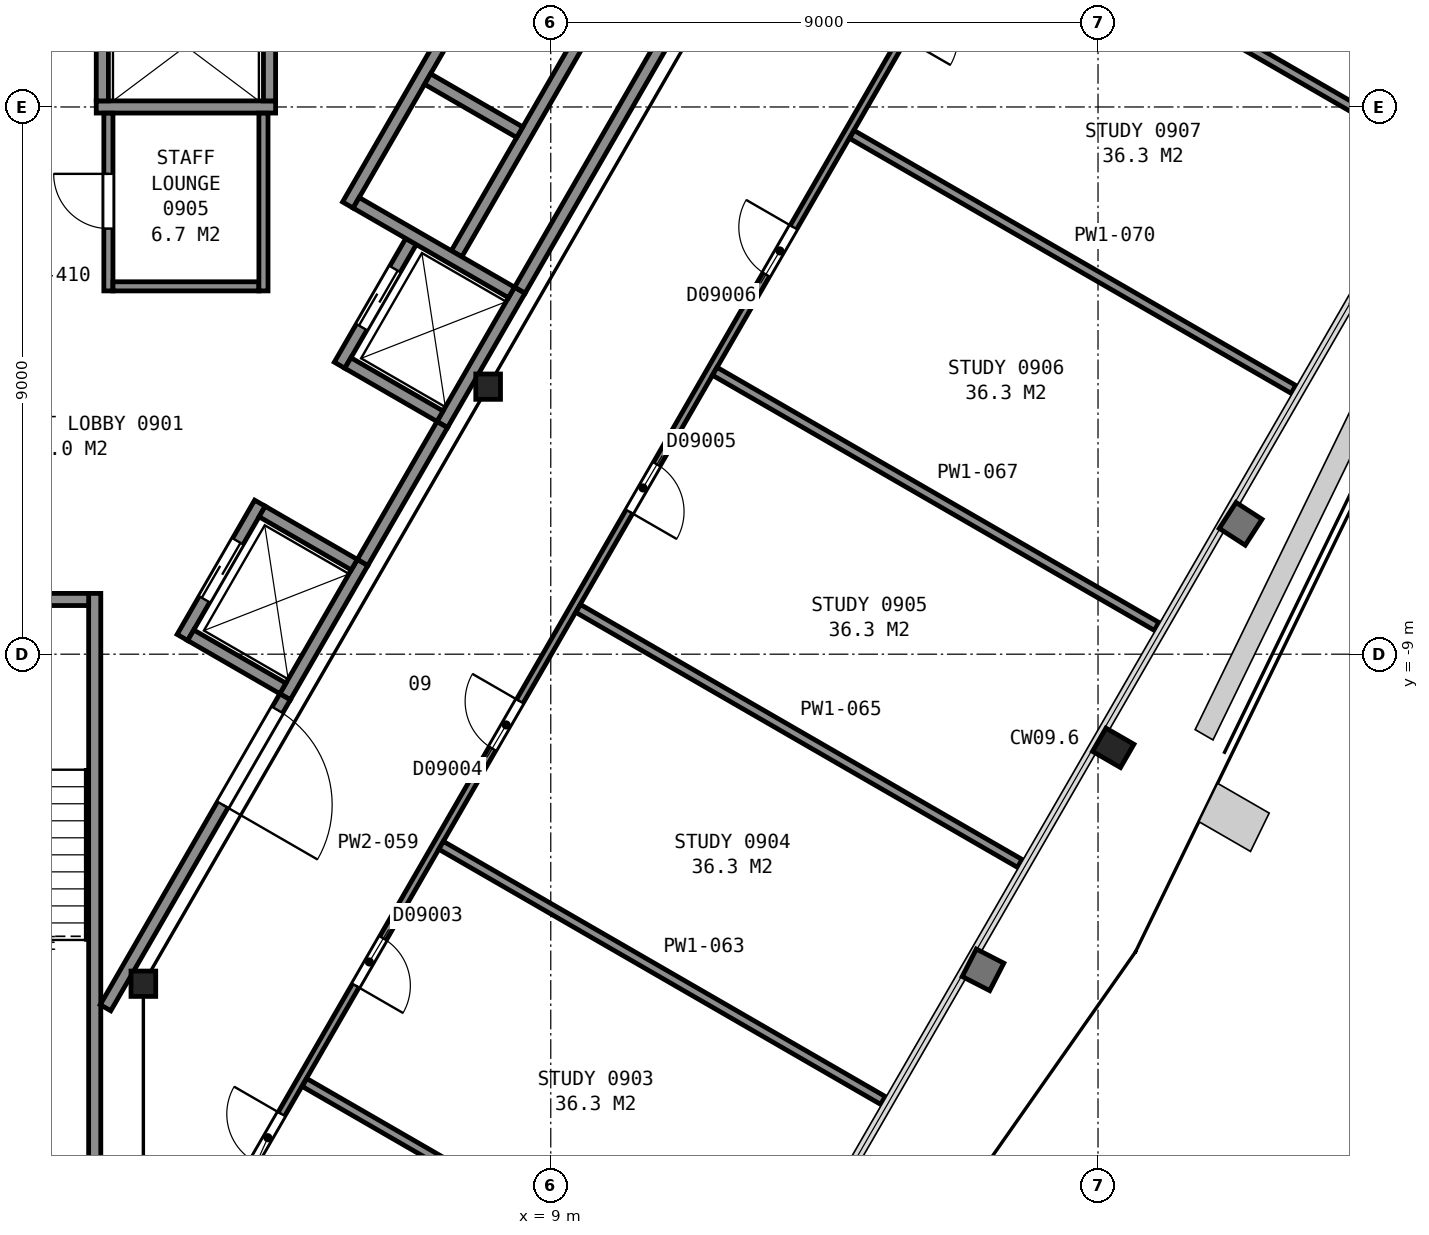
"""IFC4 building model, lengths in metres.
Left out: names, types, materials, properties, quantities, classifications, styles, units other than length and angle.
Written with IfcOpenShell. Run it as: python <this file> out.ifc"""

import sys

from ifc_helpers import new_model, si_unit, direction, frame, frame_2d, origin, origin_2d, place, context, subcontext, project, spatial, rectangle, i_section, extrude, element, fill, save


model = new_model("IFC4")
c1 = context("Model", 3, precision=1e-05, world=origin(), true_north=direction((0.0, 1.0)))
c2 = subcontext(c1, "Body", "Model", "MODEL_VIEW")
j1 = project(units=[si_unit("LENGTHUNIT", "METRE"), si_unit("PLANEANGLEUNIT", "RADIAN")], contexts=[c1])
p1 = place(None, origin())
s1 = spatial("IfcSite", under=j1, at=p1, CompositionType="ELEMENT")
p2 = place(p1, origin())
s2 = spatial("IfcBuilding", under=s1, at=p2, CompositionType="ELEMENT")
p3 = place(p2, frame((0.0, 0.0, 47.6)))
s3 = spatial("IfcBuildingStorey", under=s2, at=p3, CompositionType="ELEMENT", Elevation=47.6)
p4 = place(p3, frame((18.25, -10.54, 0.025), z_axis=(0.0, 0.0, 1.0), x_axis=(-0.5, -0.866025403784, 0.0)))
e1 = element("IfcColumn", 1, at=p4, inside=s3, PredefinedType="COLUMN", context=c2, shape_type="SweptSolid", body=[
    extrude(i_section(OverallWidth=0.442, OverallDepth=0.531, WebThickness=0.066, FlangeThickness=0.106, FilletRadius=0.015, at=origin_2d()), origin(), (0.0, 0.0, 1.0), 3.575),
])
for number, where, z_axis, x_axis in (
    (2, (2.3, -14.42, 0.0), (0.0, 0.0, 1.0), (1.0, 0.0, 0.0)),
    (3, (7.97, -4.6, 0.0), (0.0, 0.0, 1.0), (1.0, 0.0, 0.0)),
):
    element("IfcColumn", number, at=place(p3, frame(where, z_axis=z_axis, x_axis=x_axis)), inside=s3, PredefinedType="COLUMN", context=c2, shape_type="SweptSolid", body=[
        extrude(i_section(OverallWidth=0.406, OverallDepth=0.417, WebThickness=0.03, FlangeThickness=0.048, FilletRadius=0.015, at=origin_2d()), origin(), (0.0, 0.0, 1.0), 3.6),
    ])
p5 = place(p3, frame((1.5, -8.0, 0.0), z_axis=(0.0, 0.0, 1.0), x_axis=(0.0, -1.0, 0.0)))
e4 = element("IfcWall", 4, at=p5, inside=s3, PredefinedType="PARTITIONING", context=c2, shape_type="SweptSolid", body=[
    extrude(rectangle(XDim=12.0, YDim=0.2, at=frame_2d((6.0, 0.0))), origin(), (0.0, 0.0, 1.0), 3.35),
])
p6 = place(p3, frame((-1.4, -8.1, 0.0), z_axis=(0.0, 0.0, 1.0), x_axis=(1.0, 0.0, 0.0)))
e5 = element("IfcWall", 5, at=p6, inside=s3, PredefinedType="PARTITIONING", context=c2, shape_type="SweptSolid", body=[
    extrude(rectangle(XDim=2.8, YDim=0.2, at=frame_2d((1.4, 0.0))), origin(), (0.0, 0.0, 1.0), 3.35),
])
p7 = place(p3, frame((1.525, 0.0, 0.0), z_axis=(0.0, 0.0, 1.0), x_axis=(1.0, 0.0, 0.0)))
e6 = element("IfcWall", 6, at=p7, inside=s3, PredefinedType="PARTITIONING", context=c2, shape_type="SweptSolid", body=[
    extrude(rectangle(XDim=2.95, YDim=0.2, at=frame_2d((1.475, 0.0))), origin(), (0.0, 0.0, 1.0), 3.6),
])
p8 = place(p3, frame((4.63, -9.7, 0.0), z_axis=(0.0, 0.0, 1.0), x_axis=(0.500062241894, 0.865989465428, 0.0)))
e7 = element("IfcWall", 7, at=p8, inside=s3, PredefinedType="PARTITIONING", context=c2, shape_type="SweptSolid", body=[
    extrude(rectangle(XDim=2.55, YDim=0.2, at=frame_2d((1.275, 0.0))), origin(), (0.0, 0.0, 1.0), 3.6),
])
p9 = place(p3, frame((7.216, -5.222, 0.0), z_axis=(0.0, 0.0, 1.0), x_axis=(0.499990435942, 0.866030925526, 0.0)))
e8 = element("IfcWall", 8, at=p9, inside=s3, PredefinedType="PARTITIONING", context=c2, shape_type="SweptSolid", body=[
    extrude(rectangle(XDim=2.55, YDim=0.2, at=frame_2d((1.275, 0.0))), origin(), (0.0, 0.0, 1.0), 3.6),
])
p10 = place(p3, frame((7.451, -2.414, 0.0), z_axis=(0.0, 0.0, 1.0), x_axis=(0.500016218704, 0.866016039709, 0.0)))
e9 = element("IfcWall", 9, at=p10, inside=s3, PredefinedType="PARTITIONING", context=c2, shape_type="SweptSolid", body=[
    extrude(rectangle(XDim=4.7, YDim=0.2, at=frame_2d((2.35, 0.0))), origin(), (0.0, 0.0, 1.0), 3.6),
])
p11 = place(p3, frame((2.942, -8.725, 0.0), z_axis=(0.0, 0.0, 1.0), x_axis=(0.500020783669, 0.866013403995, 0.0)))
e10 = element("IfcWall", 10, at=p11, inside=s3, PredefinedType="PARTITIONING", context=c2, shape_type="SweptSolid", body=[
    extrude(rectangle(XDim=2.55, YDim=0.2, at=frame_2d((1.275, 0.0))), origin(), (0.0, 0.0, 1.0), 3.6),
])
p12 = place(p11, frame((0.725, 0.0, 0.0)))
e11 = element("IfcOpeningElement", 11, at=p12, cuts=e10, PredefinedType="OPENING", context=c2, shape_type="SweptSolid", body=[
    extrude(rectangle(XDim=1.1, YDim=2.1, at=frame_2d((0.55, 1.05))), frame((0.0, 0.11, 0.0), z_axis=(0.0, -1.0, 0.0), x_axis=(1.0, 0.0, 0.0)), (0.0, 0.0, 1.0), 0.22),
])
p13 = place(p3, frame((5.527, -4.247, 0.0), z_axis=(0.0, 0.0, 1.0), x_axis=(0.499938297808, 0.866061024631, 0.0)))
e12 = element("IfcWall", 12, at=p13, inside=s3, PredefinedType="PARTITIONING", context=c2, shape_type="SweptSolid", body=[
    extrude(rectangle(XDim=2.35, YDim=0.2, at=frame_2d((1.175, 0.0))), origin(), (0.0, 0.0, 1.0), 3.6),
])
p14 = place(p13, frame((0.725, 0.0, 0.0)))
e13 = element("IfcOpeningElement", 13, at=p14, cuts=e12, PredefinedType="OPENING", context=c2, shape_type="SweptSolid", body=[
    extrude(rectangle(XDim=1.1, YDim=2.1, at=frame_2d((0.55, 1.05))), frame((0.0, 0.11, 0.0), z_axis=(0.0, -1.0, 0.0), x_axis=(1.0, 0.0, 0.0)), (0.0, 0.0, 1.0), 0.22),
])
p15 = place(p3, frame((5.663, -1.612, 0.0), z_axis=(0.0, 0.0, 1.0), x_axis=(0.49998122708, 0.866036242063, 0.0)))
e14 = element("IfcWall", 14, at=p15, inside=s3, PredefinedType="PARTITIONING", context=c2, shape_type="SweptSolid", body=[
    extrude(rectangle(XDim=4.9, YDim=0.2, at=frame_2d((2.45, 0.0))), origin(), (0.0, 0.0, 1.0), 3.6),
])
for number, where, z_axis, x_axis in (
    (15, (4.375, 0.1, 0.0), (0.0, 0.0, 1.0), (0.0, 1.0, 0.0)),
    (16, (1.625, 0.1, 0.0), (0.0, 0.0, 1.0), (0.0, 1.0, 0.0)),
):
    element("IfcWall", number, at=place(p3, frame(where, z_axis=z_axis, x_axis=x_axis)), inside=s3, PredefinedType="PARTITIONING", context=c2, shape_type="SweptSolid", body=[
        extrude(rectangle(XDim=1.95, YDim=0.2, at=frame_2d((0.975, 0.0))), origin(), (0.0, 0.0, 1.0), 3.6),
    ])
p16 = place(p3, frame((8.49, -0.416, 0.0), z_axis=(0.0, 0.0, 1.0), x_axis=(-0.866036909293, 0.499980071345, 0.0)))
e17 = element("IfcWall", 17, at=p16, inside=s3, PredefinedType="PARTITIONING", context=c2, shape_type="SweptSolid", body=[
    extrude(rectangle(XDim=1.75, YDim=0.2, at=frame_2d((0.875, 0.0))), origin(), (0.0, 0.0, 1.0), 3.6),
])
p17 = place(p3, frame((8.354, -3.051, 0.0), z_axis=(0.0, 0.0, 1.0), x_axis=(-0.866060182126, 0.499939757307, 0.0)))
e18 = element("IfcWall", 18, at=p17, inside=s3, PredefinedType="PARTITIONING", context=c2, shape_type="SweptSolid", body=[
    extrude(rectangle(XDim=2.95, YDim=0.2, at=frame_2d((1.475, 0.0))), origin(), (0.0, 0.0, 1.0), 3.6),
])
p18 = place(p3, frame((7.179, -5.086, 0.0), z_axis=(0.0, 0.0, 1.0), x_axis=(-0.866036909293, 0.499980071345, 0.0)))
e19 = element("IfcWall", 19, at=p18, inside=s3, PredefinedType="PARTITIONING", context=c2, shape_type="SweptSolid", body=[
    extrude(rectangle(XDim=1.75, YDim=0.2, at=frame_2d((0.875, 0.0))), origin(), (0.0, 0.0, 1.0), 3.6),
])
p19 = place(p3, frame((5.769, -7.528, 0.0), z_axis=(0.0, 0.0, 1.0), x_axis=(-0.866002029911, 0.500040482552, 0.0)))
e20 = element("IfcWall", 20, at=p19, inside=s3, PredefinedType="PARTITIONING", context=c2, shape_type="SweptSolid", body=[
    extrude(rectangle(XDim=1.75, YDim=0.2, at=frame_2d((0.875, 0.0))), origin(), (0.0, 0.0, 1.0), 3.6),
])
p20 = place(p3, frame((4.594, -9.563, 0.0), z_axis=(0.0, 0.0, 1.0), x_axis=(-0.866036909293, 0.499980071345, 0.0)))
e21 = element("IfcWall", 21, at=p20, inside=s3, PredefinedType="PARTITIONING", context=c2, shape_type="SweptSolid", body=[
    extrude(rectangle(XDim=1.75, YDim=0.2, at=frame_2d((0.875, 0.0))), origin(), (0.0, 0.0, 1.0), 3.6),
])
p21 = place(p3, frame((1.677, -14.815, 0.0), z_axis=(0.0, 0.0, 1.0), x_axis=(0.49999445743, 0.866028603765, 0.0)))
e22 = element("IfcWall", 22, at=p21, inside=s3, PredefinedType="PARTITIONING", context=c2, shape_type="SweptSolid", body=[
    extrude(rectangle(XDim=5.905, YDim=0.2, at=frame_2d((2.952, 0.0))), origin(), (0.0, 0.0, 1.0), 3.35),
])
p22 = place(p21, frame((3.855, 0.0, 0.0)))
e23 = element("IfcOpeningElement", 23, at=p22, cuts=e22, PredefinedType="OPENING", context=c2, shape_type="SweptSolid", body=[
    extrude(rectangle(XDim=1.8, YDim=2.1, at=frame_2d((0.9, 1.05))), frame((0.0, 0.11, 0.0), z_axis=(0.0, -1.0, 0.0), x_axis=(1.0, 0.0, 0.0)), (0.0, 0.0, 1.0), 0.22),
])
p23 = place(p3, frame((1.725, -0.102, 0.0), z_axis=(0.0, 0.0, 1.0), x_axis=(0.0, -1.0, 0.0)))
e24 = element("IfcWall", 24, at=p23, inside=s3, PredefinedType="PARTITIONING", context=c2, shape_type="SweptSolid", body=[
    extrude(rectangle(XDim=2.923, YDim=0.15, at=frame_2d((1.461, 0.0))), origin(), (0.0, 0.0, 1.0), 3.35),
])
p24 = place(p23, frame((0.998, 0.0, 0.0)))
e25 = element("IfcOpeningElement", 25, at=p24, cuts=e24, PredefinedType="OPENING", context=c2, shape_type="SweptSolid", body=[
    extrude(rectangle(XDim=0.9, YDim=2.1, at=frame_2d((0.45, 1.05))), frame((0.0, 0.085, 0.0), z_axis=(0.0, -1.0, 0.0), x_axis=(1.0, 0.0, 0.0)), (0.0, 0.0, 1.0), 0.17),
])
p25 = place(p3, frame((1.8, -2.95, 0.0), z_axis=(0.0, 0.0, 1.0), x_axis=(1.0, 0.0, 0.0)))
e26 = element("IfcWall", 26, at=p25, inside=s3, PredefinedType="PARTITIONING", context=c2, shape_type="SweptSolid", body=[
    extrude(rectangle(XDim=2.4, YDim=0.15, at=frame_2d((1.2, 0.0))), origin(), (0.0, 0.0, 1.0), 3.35),
])
p26 = place(p3, frame((4.275, -3.025, 0.0), z_axis=(0.0, 0.0, 1.0), x_axis=(0.0, 1.0, 0.0)))
e27 = element("IfcWall", 27, at=p26, inside=s3, PredefinedType="PARTITIONING", context=c2, shape_type="SweptSolid", body=[
    extrude(rectangle(XDim=2.923, YDim=0.15, at=frame_2d((1.461, 0.0))), origin(), (0.0, 0.0, 1.0), 3.35),
])
p27 = place(p3, frame((5.906, -7.49, 0.0), z_axis=(0.0, 0.0, 1.0), x_axis=(0.500252727967, 0.865879442048, 0.0)))
e28 = element("IfcWall", 28, at=p27, inside=s3, PredefinedType="PARTITIONING", context=c2, shape_type="SweptSolid", body=[
    extrude(rectangle(XDim=2.617, YDim=0.2, at=frame_2d((1.309, 0.0))), origin(), (0.0, 0.0, 1.0), 3.35),
])
p28 = place(p3, frame((8.492, -3.012, 0.0), z_axis=(0.0, 0.0, 1.0), x_axis=(0.499972957231, 0.866041016371, 0.0)))
e29 = element("IfcWall", 29, at=p28, inside=s3, PredefinedType="PARTITIONING", context=c2, shape_type="SweptSolid", body=[
    extrude(rectangle(XDim=10.349, YDim=0.2, at=frame_2d((5.174, 0.0))), origin(), (0.0, 0.0, 1.0), 3.35),
])
p29 = place(p3, frame((17.833, 6.406, 0.0), z_axis=(0.0, 0.0, 1.0), x_axis=(-0.500002884005, -0.866023738697, 0.0)))
e30 = element("IfcWall", 30, at=p29, inside=s3, PredefinedType="PARTITIONING", context=c2, shape_type="SweptSolid", body=[
    extrude(rectangle(XDim=28.135, YDim=0.125, at=frame_2d((14.067, 0.0))), origin(), (0.0, 0.0, 1.0), 2.613),
])
p30 = place(p29, frame((26.522, 0.0, 0.0)))
e31 = element("IfcOpeningElement", 31, at=p30, cuts=e30, PredefinedType="OPENING", context=c2, shape_type="SweptSolid", body=[
    extrude(rectangle(XDim=0.9, YDim=2.1, at=frame_2d((0.45, 1.05))), frame((0.0, 0.073, 0.0), z_axis=(0.0, -1.0, 0.0), x_axis=(1.0, 0.0, 0.0)), (0.0, 0.0, 1.0), 0.145),
])
p31 = place(p29, frame((23.184, 0.0, 0.0)))
e32 = element("IfcOpeningElement", 32, at=p31, cuts=e30, PredefinedType="OPENING", context=c2, shape_type="SweptSolid", body=[
    extrude(rectangle(XDim=0.9, YDim=2.1, at=frame_2d((0.45, 1.05))), frame((0.0, 0.073, 0.0), z_axis=(0.0, -1.0, 0.0), x_axis=(1.0, 0.0, 0.0)), (0.0, 0.0, 1.0), 0.145),
])
p32 = place(p29, frame((18.683, 0.0, 0.0)))
e33 = element("IfcOpeningElement", 33, at=p32, cuts=e30, PredefinedType="OPENING", context=c2, shape_type="SweptSolid", body=[
    extrude(rectangle(XDim=0.9, YDim=2.1, at=frame_2d((0.45, 1.05))), frame((0.0, 0.073, 0.0), z_axis=(0.0, -1.0, 0.0), x_axis=(1.0, 0.0, 0.0)), (0.0, 0.0, 1.0), 0.145),
])
p33 = place(p29, frame((14.182, 0.0, 0.0)))
e34 = element("IfcOpeningElement", 34, at=p33, cuts=e30, PredefinedType="OPENING", context=c2, shape_type="SweptSolid", body=[
    extrude(rectangle(XDim=0.9, YDim=2.1, at=frame_2d((0.45, 1.05))), frame((0.0, 0.073, 0.0), z_axis=(0.0, -1.0, 0.0), x_axis=(1.0, 0.0, 0.0)), (0.0, 0.0, 1.0), 0.145),
])
p34 = place(p29, frame((9.681, 0.0, 0.0)))
e35 = element("IfcOpeningElement", 35, at=p34, cuts=e30, PredefinedType="OPENING", context=c2, shape_type="SweptSolid", body=[
    extrude(rectangle(XDim=0.9, YDim=2.1, at=frame_2d((0.45, 1.05))), frame((0.0, 0.073, 0.0), z_axis=(0.0, -1.0, 0.0), x_axis=(1.0, 0.0, 0.0)), (0.0, 0.0, 1.0), 0.145),
])
p35 = place(p29, frame((5.18, 0.0, 0.0)))
e36 = element("IfcOpeningElement", 36, at=p35, cuts=e30, PredefinedType="OPENING", context=c2, shape_type="SweptSolid", body=[
    extrude(rectangle(XDim=0.9, YDim=2.1, at=frame_2d((0.45, 1.05))), frame((0.0, 0.073, 0.0), z_axis=(0.0, -1.0, 0.0), x_axis=(1.0, 0.0, 0.0)), (0.0, 0.0, 1.0), 0.145),
])
p36 = place(p29, frame((1.278, 0.0, 0.0)))
e37 = element("IfcOpeningElement", 37, at=p36, cuts=e30, PredefinedType="OPENING", context=c2, shape_type="SweptSolid", body=[
    extrude(rectangle(XDim=0.9, YDim=2.1, at=frame_2d((0.45, 1.05))), frame((0.0, 0.073, 0.0), z_axis=(0.0, -1.0, 0.0), x_axis=(1.0, 0.0, 0.0)), (0.0, 0.0, 1.0), 0.145),
])
p37 = place(p3, frame((4.949, -16.044, 0.0), z_axis=(0.0, 0.0, 1.0), x_axis=(0.866040157966, -0.499974444137, 0.0)))
e38 = element("IfcWall", 38, at=p37, inside=s3, PredefinedType="PARTITIONING", context=c2, shape_type="SweptSolid", body=[
    extrude(rectangle(XDim=8.387, YDim=0.15, at=frame_2d((4.193, 0.0))), origin(), (0.0, 0.0, 1.0), 2.613),
])
p38 = place(p3, frame((7.196, -12.143, 0.0), z_axis=(0.0, 0.0, 1.0), x_axis=(0.866010672798, -0.500025513949, 0.0)))
e39 = element("IfcWall", 39, at=p38, inside=s3, PredefinedType="PARTITIONING", context=c2, shape_type="SweptSolid", body=[
    extrude(rectangle(XDim=8.391, YDim=0.15, at=frame_2d((4.196, 0.0))), origin(), (0.0, 0.0, 1.0), 2.613),
])
p39 = place(p3, frame((9.45, -8.248, 0.0), z_axis=(0.0, 0.0, 1.0), x_axis=(0.866040157966, -0.499974444137, 0.0)))
e40 = element("IfcWall", 40, at=p39, inside=s3, PredefinedType="PARTITIONING", context=c2, shape_type="SweptSolid", body=[
    extrude(rectangle(XDim=8.387, YDim=0.15, at=frame_2d((4.193, 0.0))), origin(), (0.0, 0.0, 1.0), 2.613),
])
p40 = place(p3, frame((11.697, -4.347, 0.0), z_axis=(0.0, 0.0, 1.0), x_axis=(0.866005348532, -0.500034735108, 0.0)))
e41 = element("IfcWall", 41, at=p40, inside=s3, PredefinedType="PARTITIONING", context=c2, shape_type="SweptSolid", body=[
    extrude(rectangle(XDim=8.392, YDim=0.15, at=frame_2d((4.196, 0.0))), origin(), (0.0, 0.0, 1.0), 2.613),
])
p41 = place(p3, frame((13.951, -0.452, 0.0), z_axis=(0.0, 0.0, 1.0), x_axis=(0.866027553047, -0.499996277349, 0.0)))
e42 = element("IfcWall", 42, at=p41, inside=s3, PredefinedType="PARTITIONING", context=c2, shape_type="SweptSolid", body=[
    extrude(rectangle(XDim=8.387, YDim=0.15, at=frame_2d((4.193, 0.0))), origin(), (0.0, 0.0, 1.0), 2.613),
])
p42 = place(p3, frame((16.202, 3.447, 0.0), z_axis=(0.0, 0.0, 1.0), x_axis=(0.866047434595, -0.499961839574, 0.0)))
e43 = element("IfcWall", 43, at=p42, inside=s3, PredefinedType="PARTITIONING", context=c2, shape_type="SweptSolid", body=[
    extrude(rectangle(XDim=8.387, YDim=0.15, at=frame_2d((4.193, 0.0))), origin(), (0.0, 0.0, 1.0), 2.613),
])
p43 = place(p12, origin())
e44 = element("IfcDoor", 44, at=p43, inside=s3, OperationType="SLIDING_TO_RIGHT", PredefinedType="DOOR", context=c2, shape_type="SweptSolid", body=[
    extrude(rectangle(XDim=1.1, YDim=2.1, at=frame_2d((0.55, 1.05))), frame((0.0, 0.025, 0.0), z_axis=(0.0, -1.0, 0.0), x_axis=(1.0, 0.0, 0.0)), (0.0, 0.0, 1.0), 0.05),
])
fill(e11, e44)
p44 = place(p14, origin())
e45 = element("IfcDoor", 45, at=p44, inside=s3, OperationType="SLIDING_TO_LEFT", PredefinedType="DOOR", context=c2, shape_type="SweptSolid", body=[
    extrude(rectangle(XDim=1.1, YDim=2.1, at=frame_2d((0.55, 1.05))), frame((0.0, 0.025, 0.0), z_axis=(0.0, -1.0, 0.0), x_axis=(1.0, 0.0, 0.0)), (0.0, 0.0, 1.0), 0.05),
])
fill(e13, e45)
p45 = place(p22, origin())
e46 = element("IfcDoor", 46, at=p45, inside=s3, OperationType="DOUBLE_DOOR_SINGLE_SWING", PredefinedType="DOOR", context=c2, shape_type="SweptSolid", body=[
    extrude(rectangle(XDim=1.8, YDim=2.1, at=frame_2d((0.9, 1.05))), frame((0.0, 0.025, 0.0), z_axis=(0.0, -1.0, 0.0), x_axis=(1.0, 0.0, 0.0)), (0.0, 0.0, 1.0), 0.05),
])
fill(e23, e46)
p46 = place(p24, origin())
e47 = element("IfcDoor", 47, at=p46, inside=s3, OperationType="SINGLE_SWING_LEFT", PredefinedType="DOOR", context=c2, shape_type="SweptSolid", body=[
    extrude(rectangle(XDim=0.9, YDim=2.1, at=frame_2d((0.45, 1.05))), frame((0.0, 0.025, 0.0), z_axis=(0.0, -1.0, 0.0), x_axis=(1.0, 0.0, 0.0)), (0.0, 0.0, 1.0), 0.05),
])
fill(e25, e47)
p47 = place(p30, origin())
e48 = element("IfcDoor", 48, at=p47, inside=s3, OperationType="SINGLE_SWING_LEFT", PredefinedType="DOOR", context=c2, shape_type="SweptSolid", body=[
    extrude(rectangle(XDim=0.9, YDim=2.1, at=frame_2d((0.45, 1.05))), frame((0.0, 0.025, 0.0), z_axis=(0.0, -1.0, 0.0), x_axis=(1.0, 0.0, 0.0)), (0.0, 0.0, 1.0), 0.05),
])
fill(e31, e48)
p48 = place(p31, origin())
e49 = element("IfcDoor", 49, at=p48, inside=s3, OperationType="SINGLE_SWING_RIGHT", PredefinedType="DOOR", context=c2, shape_type="SweptSolid", body=[
    extrude(rectangle(XDim=0.9, YDim=2.1, at=frame_2d((0.45, 1.05))), frame((0.0, 0.025, 0.0), z_axis=(0.0, -1.0, 0.0), x_axis=(1.0, 0.0, 0.0)), (0.0, 0.0, 1.0), 0.05),
])
fill(e32, e49)
p49 = place(p32, origin())
e50 = element("IfcDoor", 50, at=p49, inside=s3, OperationType="SINGLE_SWING_LEFT", PredefinedType="DOOR", context=c2, shape_type="SweptSolid", body=[
    extrude(rectangle(XDim=0.9, YDim=2.1, at=frame_2d((0.45, 1.05))), frame((0.0, 0.025, 0.0), z_axis=(0.0, -1.0, 0.0), x_axis=(1.0, 0.0, 0.0)), (0.0, 0.0, 1.0), 0.05),
])
fill(e33, e50)
p50 = place(p33, origin())
e51 = element("IfcDoor", 51, at=p50, inside=s3, OperationType="SINGLE_SWING_RIGHT", PredefinedType="DOOR", context=c2, shape_type="SweptSolid", body=[
    extrude(rectangle(XDim=0.9, YDim=2.1, at=frame_2d((0.45, 1.05))), frame((0.0, 0.025, 0.0), z_axis=(0.0, -1.0, 0.0), x_axis=(1.0, 0.0, 0.0)), (0.0, 0.0, 1.0), 0.05),
])
fill(e34, e51)
p51 = place(p34, origin())
e52 = element("IfcDoor", 52, at=p51, inside=s3, OperationType="SINGLE_SWING_LEFT", PredefinedType="DOOR", context=c2, shape_type="SweptSolid", body=[
    extrude(rectangle(XDim=0.9, YDim=2.1, at=frame_2d((0.45, 1.05))), frame((0.0, 0.025, 0.0), z_axis=(0.0, -1.0, 0.0), x_axis=(1.0, 0.0, 0.0)), (0.0, 0.0, 1.0), 0.05),
])
fill(e35, e52)
save(model, sys.argv[1])
